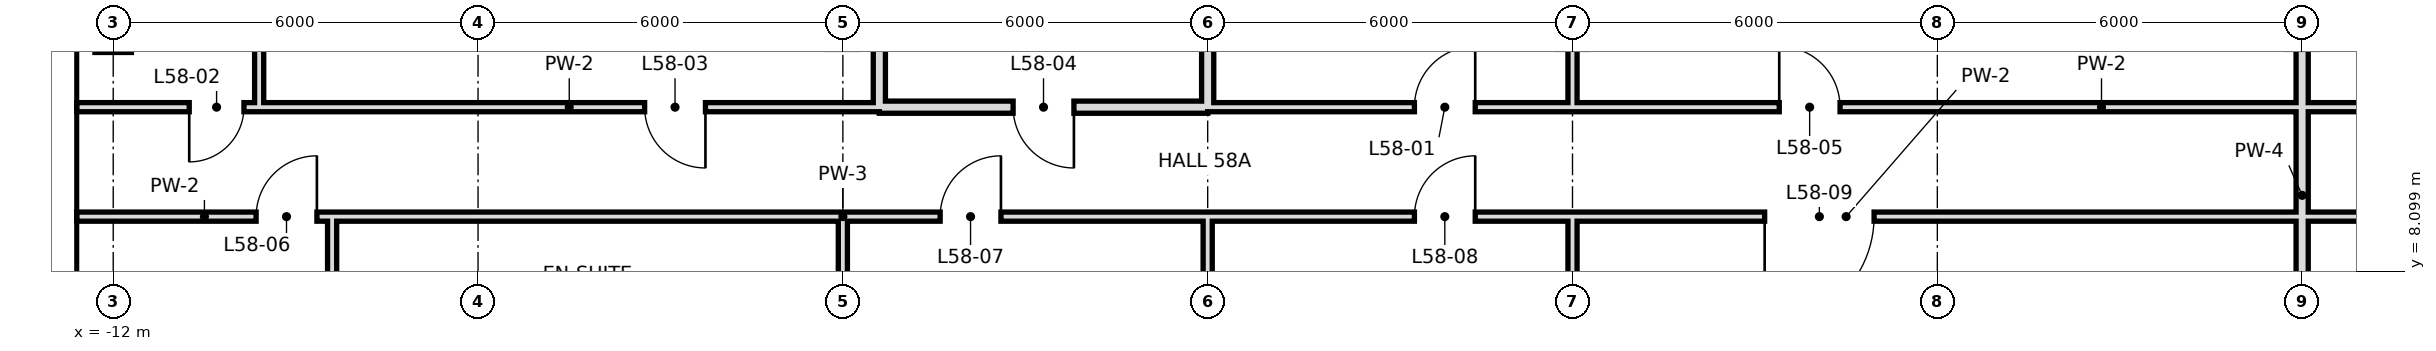
"""IFC4 building model, lengths in metres.
Left out: names, types, materials, properties, quantities, classifications, styles, units other than length and angle.
Written with IfcOpenShell. Run it as: python <this file> out.ifc"""

import sys

from ifc_helpers import new_model, si_unit, direction, frame, frame_2d, origin, place, context, subcontext, project, spatial, rectangle, extrude, element, fill, save


model = new_model("IFC4")
c1 = context("Model", 3, precision=1e-05, world=origin(), true_north=direction((0.0, 1.0)))
c2 = subcontext(c1, "Body", "Model", "MODEL_VIEW")
j1 = project(units=[si_unit("LENGTHUNIT", "METRE"), si_unit("PLANEANGLEUNIT", "RADIAN")], contexts=[c1])
p1 = place(None, origin())
s1 = spatial("IfcSite", under=j1, at=p1, CompositionType="ELEMENT")
p2 = place(p1, origin())
s2 = spatial("IfcBuilding", under=s1, at=p2, CompositionType="ELEMENT")
p3 = place(p2, frame((0.0, 0.0, 246.8)))
s3 = spatial("IfcBuildingStorey", under=s2, at=p3, CompositionType="ELEMENT", Elevation=246.8)
p4 = place(p3, frame((-8.4, 6.0, 0.0), z_axis=(0.0, 0.0, 1.0), x_axis=(0.0, 1.0, 0.0)))
e1 = element("IfcWall", 1, at=p4, inside=s3, PredefinedType="PARTITIONING", context=c2, shape_type="SweptSolid", body=[
    extrude(rectangle(XDim=3.0, YDim=0.15, at=frame_2d((1.5, 0.0))), origin(), (0.0, 0.0, 1.0), 3.42),
])
p5 = place(p3, frame((-9.6, 10.8, 0.0), z_axis=(0.0, 0.0, 1.0), x_axis=(0.0, 1.0, 0.0)))
e2 = element("IfcWall", 2, at=p5, inside=s3, PredefinedType="PARTITIONING", context=c2, shape_type="SweptSolid", body=[
    extrude(rectangle(XDim=7.2, YDim=0.15, at=frame_2d((3.6, 0.0))), origin(), (0.0, 0.0, 1.0), 3.42),
])
p6 = place(p3, frame((0.0, 6.0, 0.0), z_axis=(0.0, 0.0, 1.0), x_axis=(0.0, 1.0, 0.0)))
e3 = element("IfcWall", 3, at=p6, inside=s3, PredefinedType="PARTITIONING", context=c2, shape_type="SweptSolid", body=[
    extrude(rectangle(XDim=3.0, YDim=0.15, at=frame_2d((1.5, 0.0))), origin(), (0.0, 0.0, 1.0), 2.72),
])
p7 = place(p3, frame((0.6, 10.8, 0.0), z_axis=(0.0, 0.0, 1.0), x_axis=(0.0, 1.0, 0.0)))
e4 = element("IfcWall", 4, at=p7, inside=s3, PredefinedType="SOLIDWALL", context=c2, shape_type="SweptSolid", body=[
    extrude(rectangle(XDim=7.2, YDim=0.2, at=frame_2d((3.6, 0.0))), origin(), (0.0, 0.0, 1.0), 2.72),
])
p8 = place(p3, frame((12.0, 0.0, 0.0), z_axis=(0.0, 0.0, 1.0), x_axis=(0.0, 1.0, 0.0)))
e5 = element("IfcWall", 5, at=p8, inside=s3, PredefinedType="PARTITIONING", context=c2, shape_type="SweptSolid", body=[
    extrude(rectangle(XDim=9.0, YDim=0.15, at=frame_2d((4.5, 0.0))), origin(), (0.0, 0.0, 1.0), 2.72),
])
p9 = place(p3, frame((12.0, 10.8, 0.0), z_axis=(0.0, 0.0, 1.0), x_axis=(0.0, 1.0, 0.0)))
e6 = element("IfcWall", 6, at=p9, inside=s3, PredefinedType="PARTITIONING", context=c2, shape_type="SweptSolid", body=[
    extrude(rectangle(XDim=7.9, YDim=0.15, at=frame_2d((3.95, 0.0))), origin(), (0.0, 0.0, 1.0), 2.72),
])
p10 = place(p3, frame((24.0, 0.0, 0.0), z_axis=(0.0, 0.0, 1.0), x_axis=(0.0, 1.0, 0.0)))
e7 = element("IfcWall", 7, at=p10, inside=s3, PredefinedType="SOLIDWALL", context=c2, shape_type="SweptSolid", body=[
    extrude(rectangle(XDim=18.7, YDim=0.2, at=frame_2d((9.35, 0.0))), origin(), (0.0, 0.0, 1.0), 2.72),
])
p11 = place(p3, frame((6.0, 10.8, 0.0), z_axis=(0.0, 0.0, 1.0), x_axis=(0.0, 1.0, 0.0)))
e8 = element("IfcWall", 8, at=p11, inside=s3, PredefinedType="SOLIDWALL", context=c2, shape_type="SweptSolid", body=[
    extrude(rectangle(XDim=7.9, YDim=0.2, at=frame_2d((3.95, 0.0))), origin(), (0.0, 0.0, 1.0), 2.72),
])
p12 = place(p3, frame((6.0, -0.6, 0.0), z_axis=(0.0, 0.0, 1.0), x_axis=(0.0, 1.0, 0.0)))
e9 = element("IfcWall", 9, at=p12, inside=s3, PredefinedType="PARTITIONING", context=c2, shape_type="SweptSolid", body=[
    extrude(rectangle(XDim=9.6, YDim=0.15, at=frame_2d((4.8, 0.0))), origin(), (0.0, 0.0, 1.0), 2.72),
])
p13 = place(p3, frame((0.6, 10.8, 0.0), z_axis=(0.0, 0.0, 1.0), x_axis=(1.0, 0.0, 0.0)))
e10 = element("IfcWall", 10, at=p13, inside=s3, PredefinedType="SOLIDWALL", context=c2, shape_type="SweptSolid", body=[
    extrude(rectangle(XDim=5.4, YDim=0.2, at=frame_2d((2.7, 0.0))), origin(), (0.0, 0.0, 1.0), 2.72),
])
p14 = place(p13, frame((2.2, 0.0, 0.0)))
e11 = element("IfcOpeningElement", 11, at=p14, cuts=e10, PredefinedType="OPENING", context=c2, shape_type="SweptSolid", body=[
    extrude(rectangle(XDim=1.0, YDim=2.4, at=frame_2d((0.5, 1.2))), frame((0.0, 0.11, 0.0), z_axis=(0.0, -1.0, 0.0), x_axis=(1.0, 0.0, 0.0)), (0.0, 0.0, 1.0), 0.22),
])
p15 = place(p3, frame((-9.6, 10.8, 0.0), z_axis=(0.0, 0.0, 1.0), x_axis=(1.0, 0.0, 0.0)))
e12 = element("IfcWall", 12, at=p15, inside=s3, PredefinedType="PARTITIONING", context=c2, shape_type="SweptSolid", body=[
    extrude(rectangle(XDim=10.2, YDim=0.15, at=frame_2d((5.1, 0.0))), origin(), (0.0, 0.0, 1.0), 3.42),
])
p16 = place(p15, frame((6.34, 0.0, 0.0)))
e13 = element("IfcOpeningElement", 13, at=p16, cuts=e12, PredefinedType="OPENING", context=c2, shape_type="SweptSolid", body=[
    extrude(rectangle(XDim=1.0, YDim=2.4, at=frame_2d((0.5, 1.2))), frame((0.0, 0.085, 0.0), z_axis=(0.0, -1.0, 0.0), x_axis=(1.0, 0.0, 0.0)), (0.0, 0.0, 1.0), 0.17),
])
p17 = place(p3, frame((6.0, 10.8, 0.0), z_axis=(0.0, 0.0, 1.0), x_axis=(1.0, 0.0, 0.0)))
e14 = element("IfcWall", 14, at=p17, inside=s3, PredefinedType="PARTITIONING", context=c2, shape_type="SweptSolid", body=[
    extrude(rectangle(XDim=29.4, YDim=0.15, at=frame_2d((14.7, 0.0))), origin(), (0.0, 0.0, 1.0), 3.42),
])
p18 = place(p17, frame((3.4, 0.0, 0.0)))
e15 = element("IfcOpeningElement", 15, at=p18, cuts=e14, PredefinedType="OPENING", context=c2, shape_type="SweptSolid", body=[
    extrude(rectangle(XDim=1.0, YDim=2.4, at=frame_2d((0.5, 1.2))), frame((0.0, 0.085, 0.0), z_axis=(0.0, -1.0, 0.0), x_axis=(1.0, 0.0, 0.0)), (0.0, 0.0, 1.0), 0.17),
])
p19 = place(p17, frame((9.4, 0.0, 0.0)))
e16 = element("IfcOpeningElement", 16, at=p19, cuts=e14, PredefinedType="OPENING", context=c2, shape_type="SweptSolid", body=[
    extrude(rectangle(XDim=1.0, YDim=2.4, at=frame_2d((0.5, 1.2))), frame((0.0, 0.085, 0.0), z_axis=(0.0, -1.0, 0.0), x_axis=(1.0, 0.0, 0.0)), (0.0, 0.0, 1.0), 0.17),
])
p20 = place(p17, frame((19.3, 0.0, 0.0)))
e17 = element("IfcOpeningElement", 17, at=p20, cuts=e14, PredefinedType="OPENING", context=c2, shape_type="SweptSolid", body=[
    extrude(rectangle(XDim=1.0, YDim=2.4, at=frame_2d((0.5, 1.2))), frame((0.0, 0.085, 0.0), z_axis=(0.0, -1.0, 0.0), x_axis=(1.0, 0.0, 0.0)), (0.0, 0.0, 1.0), 0.17),
])
p21 = place(p17, frame((25.0, 0.0, 0.0)))
e18 = element("IfcOpeningElement", 18, at=p21, cuts=e14, PredefinedType="OPENING", context=c2, shape_type="SweptSolid", body=[
    extrude(rectangle(XDim=1.0, YDim=2.4, at=frame_2d((0.5, 1.2))), frame((0.0, 0.085, 0.0), z_axis=(0.0, -1.0, 0.0), x_axis=(1.0, 0.0, 0.0)), (0.0, 0.0, 1.0), 0.17),
])
p22 = place(p3, frame((-12.6, 10.8, 0.0), z_axis=(0.0, 0.0, 1.0), x_axis=(1.0, 0.0, 0.0)))
e19 = element("IfcWall", 19, at=p22, inside=s3, PredefinedType="PARTITIONING", context=c2, shape_type="SweptSolid", body=[
    extrude(rectangle(XDim=3.0, YDim=0.15, at=frame_2d((1.5, 0.0))), origin(), (0.0, 0.0, 1.0), 3.42),
])
p23 = place(p22, frame((1.85, 0.0, 0.0)))
e20 = element("IfcOpeningElement", 20, at=p23, cuts=e19, PredefinedType="OPENING", context=c2, shape_type="SweptSolid", body=[
    extrude(rectangle(XDim=0.9, YDim=2.4, at=frame_2d((0.45, 1.2))), frame((0.0, 0.085, 0.0), z_axis=(0.0, -1.0, 0.0), x_axis=(1.0, 0.0, 0.0)), (0.0, 0.0, 1.0), 0.17),
])
p24 = place(p3, frame((-12.6, 9.0, 0.0), z_axis=(0.0, 0.0, 1.0), x_axis=(1.0, 0.0, 0.0)))
e21 = element("IfcWall", 21, at=p24, inside=s3, PredefinedType="PARTITIONING", context=c2, shape_type="SweptSolid", body=[
    extrude(rectangle(XDim=4.2, YDim=0.15, at=frame_2d((2.1, 0.0))), origin(), (0.0, 0.0, 1.0), 3.42),
])
p25 = place(p24, frame((2.95, 0.0, 0.0)))
e22 = element("IfcOpeningElement", 22, at=p25, cuts=e21, PredefinedType="OPENING", context=c2, shape_type="SweptSolid", body=[
    extrude(rectangle(XDim=1.0, YDim=2.4, at=frame_2d((0.5, 1.2))), frame((0.0, 0.085, 0.0), z_axis=(0.0, -1.0, 0.0), x_axis=(1.0, 0.0, 0.0)), (0.0, 0.0, 1.0), 0.17),
])
p26 = place(p3, frame((0.0, 9.0, 0.0), z_axis=(0.0, 0.0, 1.0), x_axis=(1.0, 0.0, 0.0)))
e23 = element("IfcWall", 23, at=p26, inside=s3, PredefinedType="PARTITIONING", context=c2, shape_type="SweptSolid", body=[
    extrude(rectangle(XDim=33.0, YDim=0.15, at=frame_2d((16.5, 0.0))), origin(), (0.0, 0.0, 1.0), 3.42),
])
p27 = place(p26, frame((1.6, 0.0, 0.0)))
e24 = element("IfcOpeningElement", 24, at=p27, cuts=e23, PredefinedType="OPENING", context=c2, shape_type="SweptSolid", body=[
    extrude(rectangle(XDim=1.0, YDim=2.4, at=frame_2d((0.5, 1.2))), frame((0.0, 0.085, 0.0), z_axis=(0.0, -1.0, 0.0), x_axis=(1.0, 0.0, 0.0)), (0.0, 0.0, 1.0), 0.17),
])
p28 = place(p26, frame((9.4, 0.0, 0.0)))
e25 = element("IfcOpeningElement", 25, at=p28, cuts=e23, PredefinedType="OPENING", context=c2, shape_type="SweptSolid", body=[
    extrude(rectangle(XDim=1.0, YDim=2.4, at=frame_2d((0.5, 1.2))), frame((0.0, 0.085, 0.0), z_axis=(0.0, -1.0, 0.0), x_axis=(1.0, 0.0, 0.0)), (0.0, 0.0, 1.0), 0.17),
])
p29 = place(p26, frame((15.16, 0.0, 0.0)))
e26 = element("IfcOpeningElement", 26, at=p29, cuts=e23, PredefinedType="OPENING", context=c2, shape_type="SweptSolid", body=[
    extrude(rectangle(XDim=1.8, YDim=2.4, at=frame_2d((0.9, 1.2))), frame((0.0, 0.085, 0.0), z_axis=(0.0, -1.0, 0.0), x_axis=(1.0, 0.0, 0.0)), (0.0, 0.0, 1.0), 0.17),
])
p30 = place(p26, frame((26.1, 0.0, 0.0)))
e27 = element("IfcOpeningElement", 27, at=p30, cuts=e23, PredefinedType="OPENING", context=c2, shape_type="SweptSolid", body=[
    extrude(rectangle(XDim=1.8, YDim=2.4, at=frame_2d((0.9, 1.2))), frame((0.0, 0.085, 0.0), z_axis=(0.0, -1.0, 0.0), x_axis=(1.0, 0.0, 0.0)), (0.0, 0.0, 1.0), 0.17),
])
p31 = place(p26, frame((30.7, 0.0, 0.0)))
e28 = element("IfcOpeningElement", 28, at=p31, cuts=e23, PredefinedType="OPENING", context=c2, shape_type="SweptSolid", body=[
    extrude(rectangle(XDim=1.0, YDim=2.4, at=frame_2d((0.5, 1.2))), frame((0.0, 0.085, 0.0), z_axis=(0.0, -1.0, 0.0), x_axis=(1.0, 0.0, 0.0)), (0.0, 0.0, 1.0), 0.17),
])
p32 = place(p3, frame((-8.4, 9.0, 0.0), z_axis=(0.0, 0.0, 1.0), x_axis=(1.0, 0.0, 0.0)))
e29 = element("IfcWall", 29, at=p32, inside=s3, PredefinedType="PARTITIONING", context=c2, shape_type="SweptSolid", body=[
    extrude(rectangle(XDim=8.4, YDim=0.15, at=frame_2d((4.2, 0.0))), origin(), (0.0, 0.0, 1.0), 3.42),
])
p33 = place(p18, frame((1.0, 0.0, 0.0), z_axis=(0.0, 0.0, 1.0), x_axis=(-1.0, 0.0, 0.0)))
e30 = element("IfcDoor", 30, at=p33, inside=s3, OperationType="SINGLE_SWING_LEFT", PredefinedType="DOOR", context=c2, shape_type="SweptSolid", body=[
    extrude(rectangle(XDim=1.0, YDim=2.4, at=frame_2d((0.5, 1.2))), frame((0.0, 0.025, 0.0), z_axis=(0.0, -1.0, 0.0), x_axis=(1.0, 0.0, 0.0)), (0.0, 0.0, 1.0), 0.05),
])
fill(e15, e30)
p34 = place(p23, frame((0.9, 0.0, 0.0), z_axis=(0.0, 0.0, 1.0), x_axis=(-1.0, 0.0, 0.0)))
e31 = element("IfcDoor", 31, at=p34, inside=s3, OperationType="SINGLE_SWING_RIGHT", PredefinedType="DOOR", context=c2, shape_type="SweptSolid", body=[
    extrude(rectangle(XDim=0.9, YDim=2.4, at=frame_2d((0.45, 1.2))), frame((0.0, 0.025, 0.0), z_axis=(0.0, -1.0, 0.0), x_axis=(1.0, 0.0, 0.0)), (0.0, 0.0, 1.0), 0.05),
])
fill(e20, e31)
p35 = place(p16, origin())
e32 = element("IfcDoor", 32, at=p35, inside=s3, OperationType="SINGLE_SWING_RIGHT", PredefinedType="DOOR", context=c2, shape_type="SweptSolid", body=[
    extrude(rectangle(XDim=1.0, YDim=2.4, at=frame_2d((0.5, 1.2))), frame((0.0, 0.025, 0.0), z_axis=(0.0, -1.0, 0.0), x_axis=(1.0, 0.0, 0.0)), (0.0, 0.0, 1.0), 0.05),
])
fill(e13, e32)
p36 = place(p14, origin())
e33 = element("IfcDoor", 33, at=p36, inside=s3, OperationType="SINGLE_SWING_RIGHT", PredefinedType="DOOR", context=c2, shape_type="SweptSolid", body=[
    extrude(rectangle(XDim=1.0, YDim=2.4, at=frame_2d((0.5, 1.2))), frame((0.0, 0.025, 0.0), z_axis=(0.0, -1.0, 0.0), x_axis=(1.0, 0.0, 0.0)), (0.0, 0.0, 1.0), 0.05),
])
fill(e11, e33)
p37 = place(p19, origin())
e34 = element("IfcDoor", 34, at=p37, inside=s3, OperationType="SINGLE_SWING_LEFT", PredefinedType="DOOR", context=c2, shape_type="SweptSolid", body=[
    extrude(rectangle(XDim=1.0, YDim=2.4, at=frame_2d((0.5, 1.2))), frame((0.0, 0.025, 0.0), z_axis=(0.0, -1.0, 0.0), x_axis=(1.0, 0.0, 0.0)), (0.0, 0.0, 1.0), 0.05),
])
fill(e16, e34)
p38 = place(p25, frame((1.0, 0.0, 0.0), z_axis=(0.0, 0.0, 1.0), x_axis=(-1.0, 0.0, 0.0)))
e35 = element("IfcDoor", 35, at=p38, inside=s3, OperationType="SINGLE_SWING_LEFT", PredefinedType="DOOR", context=c2, shape_type="SweptSolid", body=[
    extrude(rectangle(XDim=1.0, YDim=2.4, at=frame_2d((0.5, 1.2))), frame((0.0, 0.025, 0.0), z_axis=(0.0, -1.0, 0.0), x_axis=(1.0, 0.0, 0.0)), (0.0, 0.0, 1.0), 0.05),
])
fill(e22, e35)
p39 = place(p27, frame((1.0, 0.0, 0.0), z_axis=(0.0, 0.0, 1.0), x_axis=(-1.0, 0.0, 0.0)))
e36 = element("IfcDoor", 36, at=p39, inside=s3, OperationType="SINGLE_SWING_LEFT", PredefinedType="DOOR", context=c2, shape_type="SweptSolid", body=[
    extrude(rectangle(XDim=1.0, YDim=2.4, at=frame_2d((0.5, 1.2))), frame((0.0, 0.025, 0.0), z_axis=(0.0, -1.0, 0.0), x_axis=(1.0, 0.0, 0.0)), (0.0, 0.0, 1.0), 0.05),
])
fill(e24, e36)
p40 = place(p28, frame((1.0, 0.0, 0.0), z_axis=(0.0, 0.0, 1.0), x_axis=(-1.0, 0.0, 0.0)))
e37 = element("IfcDoor", 37, at=p40, inside=s3, OperationType="SINGLE_SWING_LEFT", PredefinedType="DOOR", context=c2, shape_type="SweptSolid", body=[
    extrude(rectangle(XDim=1.0, YDim=2.4, at=frame_2d((0.5, 1.2))), frame((0.0, 0.025, 0.0), z_axis=(0.0, -1.0, 0.0), x_axis=(1.0, 0.0, 0.0)), (0.0, 0.0, 1.0), 0.05),
])
fill(e25, e37)
p41 = place(p29, frame((1.8, 0.0, 0.0), z_axis=(0.0, 0.0, 1.0), x_axis=(-1.0, 0.0, 0.0)))
e38 = element("IfcDoor", 38, at=p41, inside=s3, OperationType="SINGLE_SWING_RIGHT", PredefinedType="DOOR", context=c2, shape_type="SweptSolid", body=[
    extrude(rectangle(XDim=1.8, YDim=2.4, at=frame_2d((0.9, 1.2))), frame((0.0, 0.025, 0.0), z_axis=(0.0, -1.0, 0.0), x_axis=(1.0, 0.0, 0.0)), (0.0, 0.0, 1.0), 0.05),
])
fill(e26, e38)
save(model, sys.argv[1])
